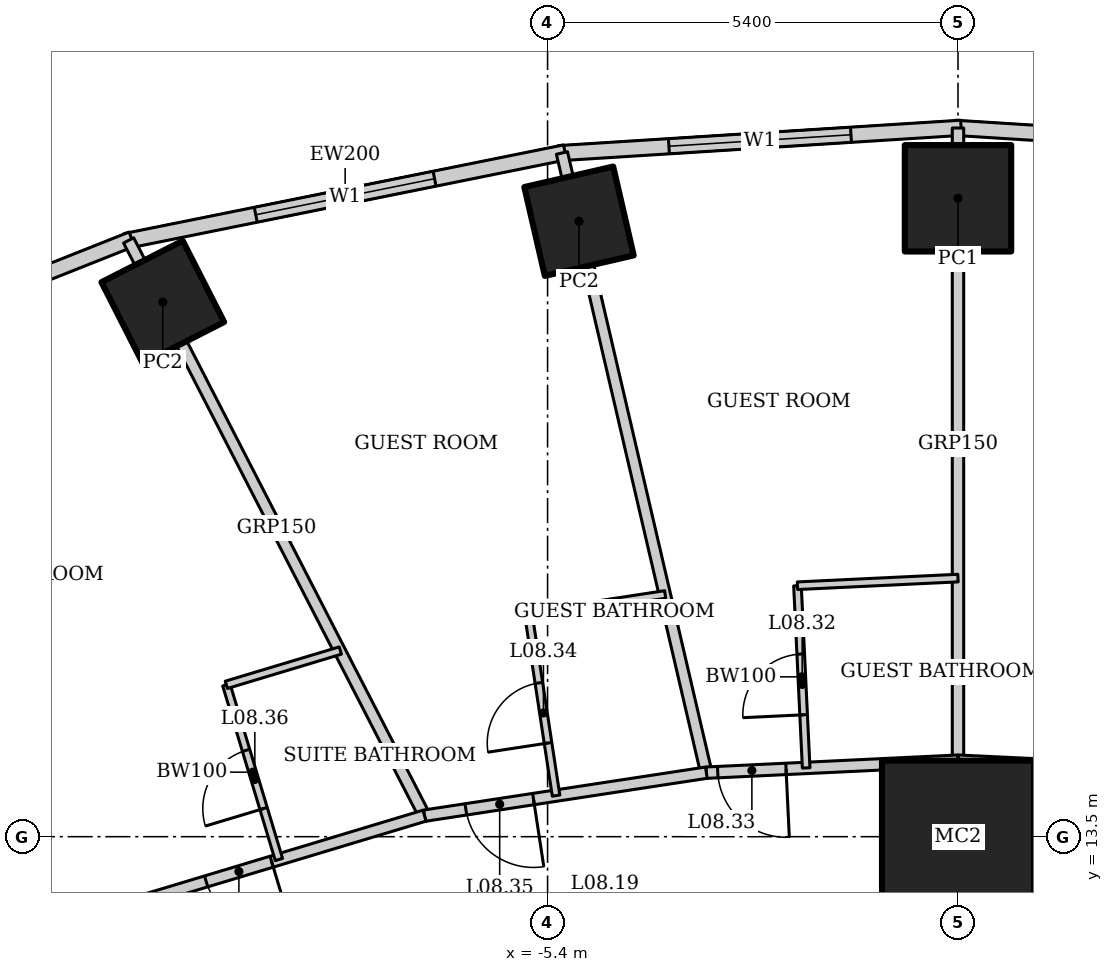
"""IFC4 building model, lengths in metres.
Left out: names, types, materials, properties, quantities, classifications, styles, units other than length and angle.
Written with IfcOpenShell. Run it as: python <this file> out.ifc"""

import sys

from ifc_helpers import new_model, si_unit, direction, frame, frame_2d, origin, origin_2d, place, context, subcontext, project, spatial, rectangle, hollow_rectangle, extrude, element, fill, save


model = new_model("IFC4")
c1 = context("Model", 3, precision=1e-05, world=origin(), true_north=direction((0.0, 1.0)))
c2 = subcontext(c1, "Body", "Model", "MODEL_VIEW")
j1 = project(units=[si_unit("LENGTHUNIT", "METRE"), si_unit("PLANEANGLEUNIT", "RADIAN")], contexts=[c1])
p1 = place(None, origin())
s1 = spatial("IfcSite", under=j1, at=p1, CompositionType="ELEMENT")
p2 = place(p1, origin())
s2 = spatial("IfcBuilding", under=s1, at=p2, CompositionType="ELEMENT")
p3 = place(p2, frame((0.0, 0.0, 44.2)))
s3 = spatial("IfcBuildingStorey", under=s2, at=p3, CompositionType="ELEMENT", Elevation=44.2)
p4 = place(p3, frame((0.0, 13.5, 0.0), z_axis=(0.0, 0.0, 1.0), x_axis=(1.0, 0.0, 0.0)))
e1 = element("IfcColumn", 1, at=p4, inside=s3, PredefinedType="COLUMN", context=c2, shape_type="SweptSolid", body=[
    extrude(hollow_rectangle(XDim=2.0, YDim=2.0, WallThickness=0.17, at=origin_2d()), origin(), (0.0, 0.0, 1.0), 3.6),
])
p5 = place(p3, frame((0.0, 21.9, 0.0), z_axis=(0.0, 0.0, 1.0), x_axis=(1.0, 0.0, 0.0)))
e2 = element("IfcColumn", 2, at=p5, inside=s3, PredefinedType="COLUMN", context=c2, shape_type="SweptSolid", body=[
    extrude(hollow_rectangle(XDim=1.4, YDim=1.4, WallThickness=0.1, at=origin_2d()), origin(), (0.0, 0.0, 1.0), 3.6),
])
for number, where, z_axis, x_axis in (
    (3, (-4.986, 21.598, 0.0), (0.0, 0.0, 1.0), (0.974, 0.225, 0.0)),
    (4, (-10.463, 20.534, 0.0), (0.0, 0.0, 1.0), (0.891, 0.454, 0.0)),
):
    element("IfcColumn", number, at=place(p3, frame(where, z_axis=z_axis, x_axis=x_axis)), inside=s3, PredefinedType="COLUMN", context=c2, shape_type="SweptSolid", body=[
        extrude(hollow_rectangle(XDim=1.2, YDim=1.2, WallThickness=0.1, at=origin_2d()), origin(), (0.0, 0.0, 1.0), 3.6),
    ])
p6 = place(p3, frame((5.253, 22.493, 0.0), z_axis=(0.0, 0.0, 1.0), x_axis=(-0.998018582375, 0.062919863585, 0.0)))
e5 = element("IfcWall", 5, at=p6, inside=s3, PredefinedType="SOLIDWALL", context=c2, shape_type="SweptSolid", body=[
    extrude(rectangle(XDim=5.304, YDim=0.2, at=frame_2d((2.652, 0.0))), origin(), (0.0, 0.0, 1.0), 3.45),
])
p7 = place(p6, frame((1.452, 0.0, 0.5)))
e6 = element("IfcOpeningElement", 6, at=p7, cuts=e5, PredefinedType="OPENING", context=c2, shape_type="SweptSolid", body=[
    extrude(rectangle(XDim=2.4, YDim=2.2, at=frame_2d((1.2, 1.1))), frame((0.0, 0.11, 0.0), z_axis=(0.0, -1.0, 0.0), x_axis=(1.0, 0.0, 0.0)), (0.0, 0.0, 1.0), 0.22),
])
p8 = place(p3, frame((0.041, 22.827, 0.0), z_axis=(0.0, 0.0, 1.0), x_axis=(-0.998018582375, -0.062919863585, 0.0)))
e7 = element("IfcWall", 7, at=p8, inside=s3, PredefinedType="SOLIDWALL", context=c2, shape_type="SweptSolid", body=[
    extrude(rectangle(XDim=5.304, YDim=0.2, at=frame_2d((2.652, 0.0))), origin(), (0.0, 0.0, 1.0), 3.45),
])
p9 = place(p8, frame((1.452, 0.0, 0.5)))
e8 = element("IfcOpeningElement", 8, at=p9, cuts=e7, PredefinedType="OPENING", context=c2, shape_type="SweptSolid", body=[
    extrude(rectangle(XDim=2.4, YDim=2.2, at=frame_2d((1.2, 1.1))), frame((0.0, 0.11, 0.0), z_axis=(0.0, -1.0, 0.0), x_axis=(1.0, 0.0, 0.0)), (0.0, 0.0, 1.0), 0.22),
])
p10 = place(p3, frame((-5.17, 22.504, 0.0), z_axis=(0.0, 0.0, 1.0), x_axis=(-0.980251657452, -0.197754110105, 0.0)))
e9 = element("IfcWall", 9, at=p10, inside=s3, PredefinedType="SOLIDWALL", context=c2, shape_type="SweptSolid", body=[
    extrude(rectangle(XDim=5.904, YDim=0.2, at=frame_2d((2.952, 0.0))), origin(), (0.0, 0.0, 1.0), 3.45),
])
p11 = place(p10, frame((1.752, 0.0, 0.5)))
e10 = element("IfcOpeningElement", 10, at=p11, cuts=e9, PredefinedType="OPENING", context=c2, shape_type="SweptSolid", body=[
    extrude(rectangle(XDim=2.4, YDim=2.2, at=frame_2d((1.2, 1.1))), frame((0.0, 0.11, 0.0), z_axis=(0.0, -1.0, 0.0), x_axis=(1.0, 0.0, 0.0)), (0.0, 0.0, 1.0), 0.22),
])
p12 = place(p3, frame((-10.869, 21.363, 0.0), z_axis=(0.0, 0.0, 1.0), x_axis=(-0.929358351251, -0.369178892895, 0.0)))
e11 = element("IfcWall", 11, at=p12, inside=s3, PredefinedType="SOLIDWALL", context=c2, shape_type="SweptSolid", body=[
    extrude(rectangle(XDim=7.692, YDim=0.2, at=frame_2d((3.846, 0.0))), origin(), (0.0, 0.0, 1.0), 3.45),
])
p13 = place(p12, frame((2.646, 0.0, 0.5)))
e12 = element("IfcOpeningElement", 12, at=p13, cuts=e11, PredefinedType="OPENING", context=c2, shape_type="SweptSolid", body=[
    extrude(rectangle(XDim=2.4, YDim=2.2, at=frame_2d((1.2, 1.1))), frame((0.0, 0.11, 0.0), z_axis=(0.0, -1.0, 0.0), x_axis=(1.0, 0.0, 0.0)), (0.0, 0.0, 1.0), 0.22),
])
p14 = place(p3, frame((0.0, 22.825, 0.0), z_axis=(0.0, 0.0, 1.0), x_axis=(0.0, -1.0, 0.0)))
e13 = element("IfcWall", 13, at=p14, inside=s3, PredefinedType="PARTITIONING", context=c2, shape_type="SweptSolid", body=[
    extrude(rectangle(XDim=8.325, YDim=0.15, at=frame_2d((4.162, 0.0))), origin(), (0.0, 0.0, 1.0), 2.924),
])
p15 = place(p3, frame((-5.211, 22.496, 0.0), z_axis=(0.0, 0.0, 1.0), x_axis=(0.226929086033, -0.973911284416, 0.0)))
e14 = element("IfcWall", 14, at=p15, inside=s3, PredefinedType="PARTITIONING", context=c2, shape_type="SweptSolid", body=[
    extrude(rectangle(XDim=8.372, YDim=0.15, at=frame_2d((4.186, 0.0))), origin(), (0.0, 0.0, 1.0), 2.767),
])
p16 = place(p3, frame((-10.912, 21.346, 0.0), z_axis=(0.0, 0.0, 1.0), x_axis=(0.457327273085, -0.889298468059, 0.0)))
e15 = element("IfcWall", 15, at=p16, inside=s3, PredefinedType="PARTITIONING", context=c2, shape_type="SweptSolid", body=[
    extrude(rectangle(XDim=8.511, YDim=0.15, at=frame_2d((4.256, 0.0))), origin(), (0.0, 0.0, 1.0), 2.528),
])
p17 = place(p3, frame((3.311, 14.342, 0.0), z_axis=(0.0, 0.0, 1.0), x_axis=(-0.998863968075, 0.047652631422, 0.0)))
e16 = element("IfcWall", 16, at=p17, inside=s3, PredefinedType="PARTITIONING", context=c2, shape_type="SweptSolid", body=[
    extrude(rectangle(XDim=3.315, YDim=0.15, at=frame_2d((1.657, 0.0))), origin(), (0.0, 0.0, 1.0), 3.45),
])
p18 = place(p3, frame((0.0, 14.5, 0.0), z_axis=(0.0, 0.0, 1.0), x_axis=(-0.998863968075, -0.047652631422, 0.0)))
e17 = element("IfcWall", 17, at=p18, inside=s3, PredefinedType="PARTITIONING", context=c2, shape_type="SweptSolid", body=[
    extrude(rectangle(XDim=3.315, YDim=0.15, at=frame_2d((1.657, 0.0))), origin(), (0.0, 0.0, 1.0), 3.45),
])
p19 = place(p18, frame((2.265, 0.0, 0.0)))
e18 = element("IfcOpeningElement", 18, at=p19, cuts=e17, PredefinedType="OPENING", context=c2, shape_type="SweptSolid", body=[
    extrude(rectangle(XDim=0.9, YDim=2.1, at=frame_2d((0.45, 1.05))), frame((0.0, 0.085, 0.0), z_axis=(0.0, -1.0, 0.0), x_axis=(1.0, 0.0, 0.0)), (0.0, 0.0, 1.0), 0.17),
])
p20 = place(p3, frame((-3.311, 14.342, 0.0), z_axis=(0.0, 0.0, 1.0), x_axis=(-0.988564270062, -0.150800145746, 0.0)))
e19 = element("IfcWall", 19, at=p20, inside=s3, PredefinedType="PARTITIONING", context=c2, shape_type="SweptSolid", body=[
    extrude(rectangle(XDim=3.751, YDim=0.15, at=frame_2d((1.875, 0.0))), origin(), (0.0, 0.0, 1.0), 3.45),
])
p21 = place(p20, frame((2.3, 0.0, 0.0)))
e20 = element("IfcOpeningElement", 20, at=p21, cuts=e19, PredefinedType="OPENING", context=c2, shape_type="SweptSolid", body=[
    extrude(rectangle(XDim=0.9, YDim=2.1, at=frame_2d((0.45, 1.05))), frame((0.0, 0.085, 0.0), z_axis=(0.0, -1.0, 0.0), x_axis=(1.0, 0.0, 0.0)), (0.0, 0.0, 1.0), 0.17),
])
p22 = place(p3, frame((-7.019, 13.776, 0.0), z_axis=(0.0, 0.0, 1.0), x_axis=(-0.957564241242, -0.288219922793, 0.0)))
e21 = element("IfcWall", 21, at=p22, inside=s3, PredefinedType="PARTITIONING", context=c2, shape_type="SweptSolid", body=[
    extrude(rectangle(XDim=5.085, YDim=0.15, at=frame_2d((2.542, 0.0))), origin(), (0.0, 0.0, 1.0), 3.45),
])
p23 = place(p22, frame((2.1, 0.0, 0.0)))
e22 = element("IfcOpeningElement", 22, at=p23, cuts=e21, PredefinedType="OPENING", context=c2, shape_type="SweptSolid", body=[
    extrude(rectangle(XDim=0.9, YDim=2.1, at=frame_2d((0.45, 1.05))), frame((0.0, 0.085, 0.0), z_axis=(0.0, -1.0, 0.0), x_axis=(1.0, 0.0, 0.0)), (0.0, 0.0, 1.0), 0.17),
])
p24 = place(p3, frame((-1.998, 14.405, 0.0), z_axis=(0.0, 0.0, 1.0), x_axis=(-0.047608648396, 0.998866065395, 0.0)))
e23 = element("IfcWall", 23, at=p24, inside=s3, PredefinedType="PARTITIONING", context=c2, shape_type="SweptSolid", body=[
    extrude(rectangle(XDim=2.4, YDim=0.1, at=frame_2d((1.2, 0.0))), origin(), (0.0, 0.0, 1.0), 2.749),
])
p25 = place(p24, frame((0.7, 0.0, 0.0)))
e24 = element("IfcOpeningElement", 24, at=p25, cuts=e23, PredefinedType="OPENING", context=c2, shape_type="SweptSolid", body=[
    extrude(rectangle(XDim=0.8, YDim=2.1, at=frame_2d((0.4, 1.05))), frame((0.0, 0.06, 0.0), z_axis=(0.0, -1.0, 0.0), x_axis=(1.0, 0.0, 0.0)), (0.0, 0.0, 1.0), 0.12),
])
p26 = place(p3, frame((-2.112, 16.802, 0.0), z_axis=(0.0, 0.0, 1.0), x_axis=(0.998862383453, 0.047685835668, 0.0)))
e25 = element("IfcWall", 25, at=p26, inside=s3, PredefinedType="PARTITIONING", context=c2, shape_type="SweptSolid", body=[
    extrude(rectangle(XDim=2.115, YDim=0.1, at=frame_2d((1.057, 0.0))), origin(), (0.0, 0.0, 1.0), 3.45),
])
p27 = place(p3, frame((-5.288, 14.041, 0.0), z_axis=(0.0, 0.0, 1.0), x_axis=(-0.150757550564, 0.988570766788, 0.0)))
e26 = element("IfcWall", 26, at=p27, inside=s3, PredefinedType="PARTITIONING", context=c2, shape_type="SweptSolid", body=[
    extrude(rectangle(XDim=2.4, YDim=0.1, at=frame_2d((1.2, 0.0))), origin(), (0.0, 0.0, 1.0), 3.45),
])
p28 = place(p27, frame((0.7, 0.0, 0.0)))
e27 = element("IfcOpeningElement", 27, at=p28, cuts=e26, PredefinedType="OPENING", context=c2, shape_type="SweptSolid", body=[
    extrude(rectangle(XDim=0.8, YDim=2.1, at=frame_2d((0.4, 1.05))), frame((0.0, 0.06, 0.0), z_axis=(0.0, -1.0, 0.0), x_axis=(1.0, 0.0, 0.0)), (0.0, 0.0, 1.0), 0.12),
])
p29 = place(p3, frame((-5.65, 16.413, 0.0), z_axis=(0.0, 0.0, 1.0), x_axis=(0.988567991054, 0.150775750911, 0.0)))
e28 = element("IfcWall", 28, at=p29, inside=s3, PredefinedType="PARTITIONING", context=c2, shape_type="SweptSolid", body=[
    extrude(rectangle(XDim=1.818, YDim=0.1, at=frame_2d((0.909, 0.0))), origin(), (0.0, 0.0, 1.0), 3.45),
])
p30 = place(p3, frame((-8.935, 13.2, 0.0), z_axis=(0.0, 0.0, 1.0), x_axis=(-0.288197066254, 0.957571120598, 0.0)))
e29 = element("IfcWall", 29, at=p30, inside=s3, PredefinedType="PARTITIONING", context=c2, shape_type="SweptSolid", body=[
    extrude(rectangle(XDim=2.4, YDim=0.1, at=frame_2d((1.2, 0.0))), origin(), (0.0, 0.0, 1.0), 3.45),
])
p31 = place(p30, frame((0.7, 0.0, 0.0)))
e30 = element("IfcOpeningElement", 30, at=p31, cuts=e29, PredefinedType="OPENING", context=c2, shape_type="SweptSolid", body=[
    extrude(rectangle(XDim=0.8, YDim=2.1, at=frame_2d((0.4, 1.05))), frame((0.0, 0.06, 0.0), z_axis=(0.0, -1.0, 0.0), x_axis=(1.0, 0.0, 0.0)), (0.0, 0.0, 1.0), 0.12),
])
p32 = place(p3, frame((-9.626, 15.498, 0.0), z_axis=(0.0, 0.0, 1.0), x_axis=(0.957551231109, 0.288263143328, 0.0)))
e31 = element("IfcWall", 31, at=p32, inside=s3, PredefinedType="PARTITIONING", context=c2, shape_type="SweptSolid", body=[
    extrude(rectangle(XDim=1.566, YDim=0.1, at=frame_2d((0.783, 0.0))), origin(), (0.0, 0.0, 1.0), 3.45),
])
p33 = place(p3, frame((-16.944, 17.545, 0.0), z_axis=(0.0, 0.0, 1.0), x_axis=(0.694669949151, -0.719328618746, 0.0)))
e32 = element("IfcWall", 32, at=p33, inside=s3, PredefinedType="PARTITIONING", context=c2, shape_type="SweptSolid", body=[
    extrude(rectangle(XDim=7.277, YDim=0.1, at=frame_2d((3.639, 0.0))), origin(), (0.0, 0.0, 1.0), 2.528),
])
p34 = place(p33, frame((3.189, 0.0, 0.0)))
e33 = element("IfcOpeningElement", 33, at=p34, cuts=e32, PredefinedType="OPENING", context=c2, shape_type="SweptSolid", body=[
    extrude(rectangle(XDim=0.9, YDim=2.1, at=frame_2d((0.45, 1.05))), frame((0.0, 0.06, 0.0), z_axis=(0.0, -1.0, 0.0), x_axis=(1.0, 0.0, 0.0)), (0.0, 0.0, 1.0), 0.12),
])
p35 = place(p9, origin())
e34 = element("IfcWindow", 34, at=p35, inside=s3, PartitioningType="SINGLE_PANEL", PredefinedType="WINDOW", context=c2, shape_type="SweptSolid", body=[
    extrude(rectangle(XDim=2.4, YDim=2.2, at=frame_2d((1.2, 1.1))), frame((0.0, 0.03, 0.0), z_axis=(0.0, -1.0, 0.0), x_axis=(1.0, 0.0, 0.0)), (0.0, 0.0, 1.0), 0.06),
])
fill(e8, e34)
p36 = place(p11, origin())
e35 = element("IfcWindow", 35, at=p36, inside=s3, PartitioningType="SINGLE_PANEL", PredefinedType="WINDOW", context=c2, shape_type="SweptSolid", body=[
    extrude(rectangle(XDim=2.4, YDim=2.2, at=frame_2d((1.2, 1.1))), frame((0.0, 0.03, 0.0), z_axis=(0.0, -1.0, 0.0), x_axis=(1.0, 0.0, 0.0)), (0.0, 0.0, 1.0), 0.06),
])
fill(e10, e35)
p37 = place(p25, origin())
e36 = element("IfcDoor", 36, at=p37, inside=s3, OperationType="SINGLE_SWING_LEFT", PredefinedType="DOOR", context=c2, shape_type="SweptSolid", body=[
    extrude(rectangle(XDim=0.8, YDim=2.1, at=frame_2d((0.4, 1.05))), frame((0.0, 0.025, 0.0), z_axis=(0.0, -1.0, 0.0), x_axis=(1.0, 0.0, 0.0)), (0.0, 0.0, 1.0), 0.05),
])
fill(e24, e36)
p38 = place(p19, origin())
e37 = element("IfcDoor", 37, at=p38, inside=s3, OperationType="SINGLE_SWING_LEFT", PredefinedType="DOOR", context=c2, shape_type="SweptSolid", body=[
    extrude(rectangle(XDim=0.9, YDim=2.1, at=frame_2d((0.45, 1.05))), frame((0.0, 0.025, 0.0), z_axis=(0.0, -1.0, 0.0), x_axis=(1.0, 0.0, 0.0)), (0.0, 0.0, 1.0), 0.05),
])
fill(e18, e37)
p39 = place(p28, origin())
e38 = element("IfcDoor", 38, at=p39, inside=s3, OperationType="SINGLE_SWING_LEFT", PredefinedType="DOOR", context=c2, shape_type="SweptSolid", body=[
    extrude(rectangle(XDim=0.8, YDim=2.1, at=frame_2d((0.4, 1.05))), frame((0.0, 0.025, 0.0), z_axis=(0.0, -1.0, 0.0), x_axis=(1.0, 0.0, 0.0)), (0.0, 0.0, 1.0), 0.05),
])
fill(e27, e38)
p40 = place(p21, origin())
e39 = element("IfcDoor", 39, at=p40, inside=s3, OperationType="SINGLE_SWING_LEFT", PredefinedType="DOOR", context=c2, shape_type="SweptSolid", body=[
    extrude(rectangle(XDim=0.9, YDim=2.1, at=frame_2d((0.45, 1.05))), frame((0.0, 0.025, 0.0), z_axis=(0.0, -1.0, 0.0), x_axis=(1.0, 0.0, 0.0)), (0.0, 0.0, 1.0), 0.05),
])
fill(e20, e39)
p41 = place(p31, origin())
e40 = element("IfcDoor", 40, at=p41, inside=s3, OperationType="SINGLE_SWING_LEFT", PredefinedType="DOOR", context=c2, shape_type="SweptSolid", body=[
    extrude(rectangle(XDim=0.8, YDim=2.1, at=frame_2d((0.4, 1.05))), frame((0.0, 0.025, 0.0), z_axis=(0.0, -1.0, 0.0), x_axis=(1.0, 0.0, 0.0)), (0.0, 0.0, 1.0), 0.05),
])
fill(e30, e40)
p42 = place(p23, origin())
e41 = element("IfcDoor", 41, at=p42, inside=s3, OperationType="SINGLE_SWING_LEFT", PredefinedType="DOOR", context=c2, shape_type="SweptSolid", body=[
    extrude(rectangle(XDim=0.9, YDim=2.1, at=frame_2d((0.45, 1.05))), frame((0.0, 0.025, 0.0), z_axis=(0.0, -1.0, 0.0), x_axis=(1.0, 0.0, 0.0)), (0.0, 0.0, 1.0), 0.05),
])
fill(e22, e41)
save(model, sys.argv[1])
